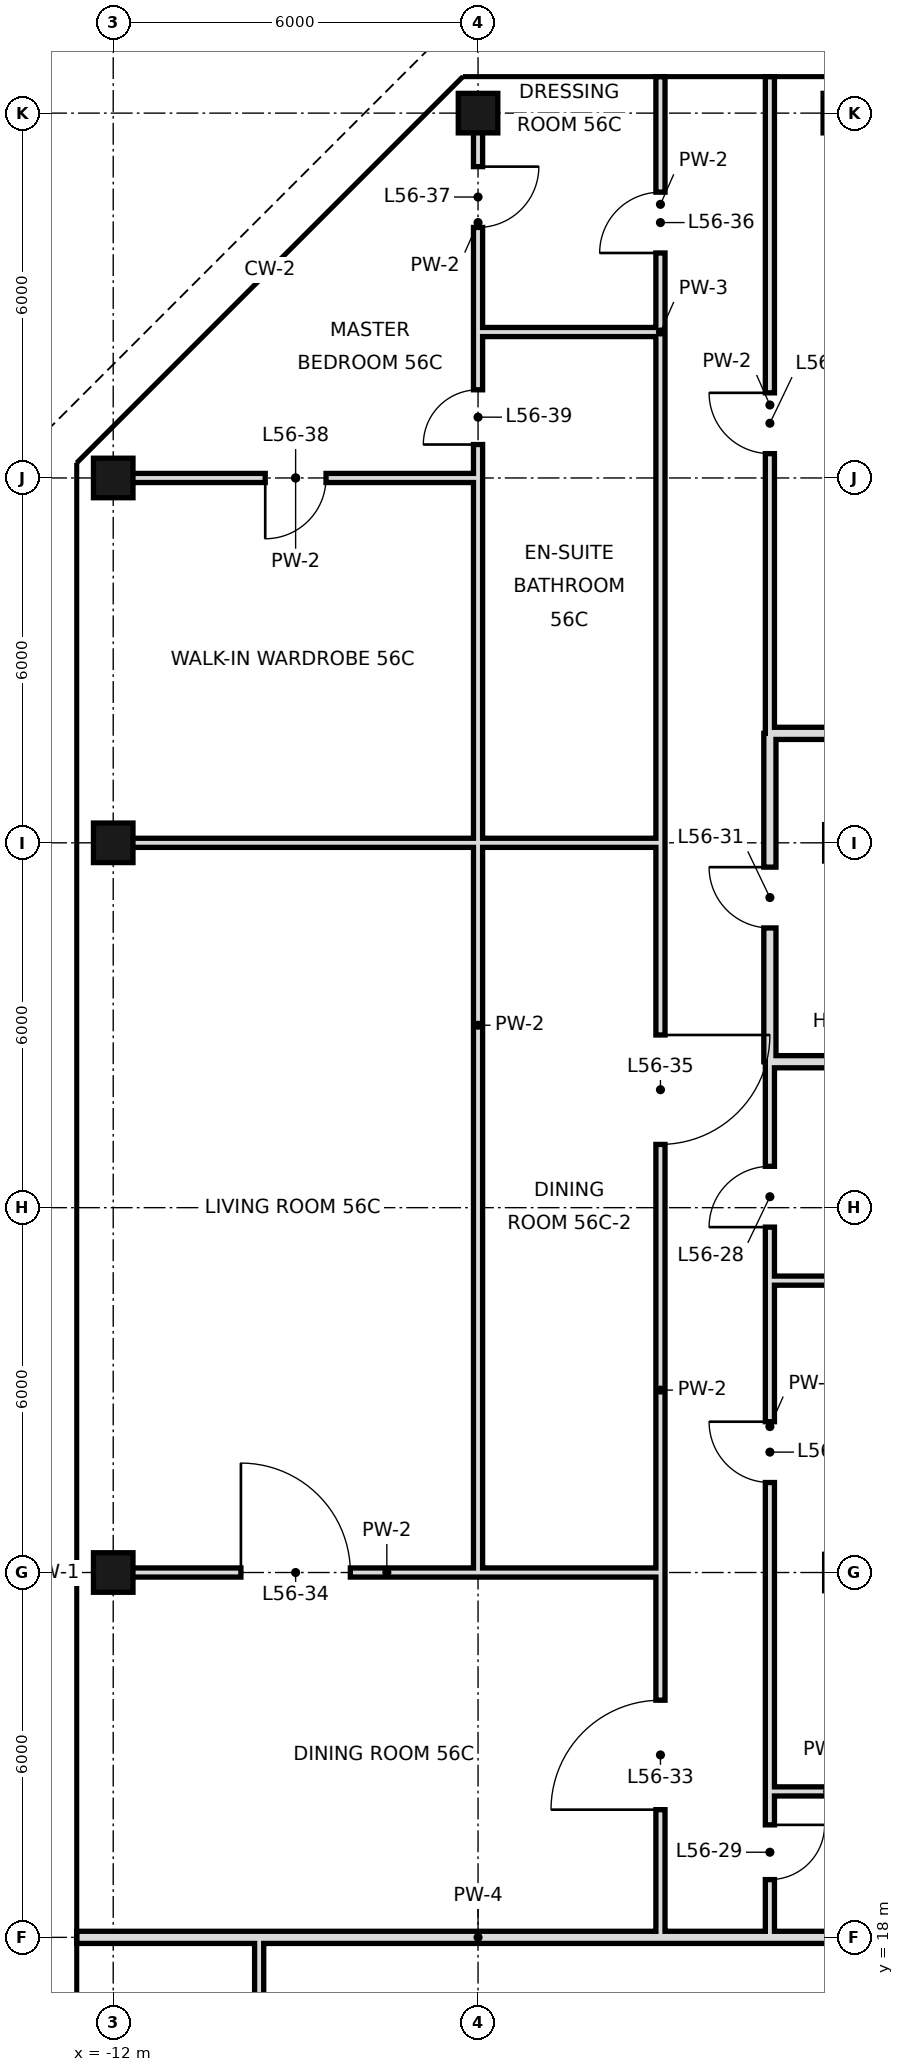
"""IFC4 building model, lengths in metres.
Left out: names, types, materials, properties, quantities, classifications, styles, units other than length and angle.
Written with IfcOpenShell. Run it as: python <this file> out.ifc"""

import sys

from ifc_helpers import new_model, si_unit, direction, frame, frame_2d, origin, origin_2d, place, context, subcontext, project, spatial, rectangle, hollow_rectangle, extrude, element, fill, save


model = new_model("IFC4")
c1 = context("Model", 3, precision=1e-05, world=origin(), true_north=direction((0.0, 1.0)))
c2 = subcontext(c1, "Body", "Model", "MODEL_VIEW")
j1 = project(units=[si_unit("LENGTHUNIT", "METRE"), si_unit("PLANEANGLEUNIT", "RADIAN")], contexts=[c1])
p1 = place(None, origin())
s1 = spatial("IfcSite", under=j1, at=p1, CompositionType="ELEMENT")
p2 = place(p1, origin())
s2 = spatial("IfcBuilding", under=s1, at=p2, CompositionType="ELEMENT")
p3 = place(p2, frame((0.0, 0.0, 239.6)))
s3 = spatial("IfcBuildingStorey", under=s2, at=p3, CompositionType="ELEMENT", Elevation=239.6)
for number, where, z_axis, x_axis in (
    (1, (-12.0, 24.0, 0.0), (0.0, 0.0, 1.0), (1.0, 0.0, 0.0)),
    (2, (-12.0, 36.0, 0.0), (0.0, 0.0, 1.0), (1.0, 0.0, 0.0)),
    (3, (-12.0, 42.0, 0.0), (0.0, 0.0, 1.0), (1.0, 0.0, 0.0)),
    (4, (-6.0, 48.0, 0.0), (0.0, 0.0, 1.0), (1.0, 0.0, 0.0)),
    (5, (0.0, 48.0, 0.0), (0.0, 0.0, 1.0), (1.0, 0.0, 0.0)),
):
    element("IfcColumn", number, at=place(p3, frame(where, z_axis=z_axis, x_axis=x_axis)), inside=s3, PredefinedType="COLUMN", context=c2, shape_type="SweptSolid", body=[
        extrude(hollow_rectangle(XDim=0.65, YDim=0.65, WallThickness=0.032, at=origin_2d()), origin(), (0.0, 0.0, 1.0), 3.6),
    ])
p4 = place(p3, frame((-1.2, 32.4, 0.0), z_axis=(0.0, 0.0, 1.0), x_axis=(0.0, 1.0, 0.0)))
e6 = element("IfcWall", 6, at=p4, inside=s3, PredefinedType="SOLIDWALL", context=c2, shape_type="SweptSolid", body=[
    extrude(rectangle(XDim=5.4, YDim=0.2, at=frame_2d((2.7, 0.0))), origin(), (0.0, 0.0, 1.0), 2.72),
])
p5 = place(p4, frame((2.2, 0.0, 0.0)))
e7 = element("IfcOpeningElement", 7, at=p5, cuts=e6, PredefinedType="OPENING", context=c2, shape_type="SweptSolid", body=[
    extrude(rectangle(XDim=1.0, YDim=2.4, at=frame_2d((0.5, 1.2))), frame((0.0, 0.11, 0.0), z_axis=(0.0, -1.0, 0.0), x_axis=(1.0, 0.0, 0.0)), (0.0, 0.0, 1.0), 0.22),
])
p6 = place(p3, frame((-1.2, 20.4, 0.0), z_axis=(0.0, 0.0, 1.0), x_axis=(0.0, 1.0, 0.0)))
e8 = element("IfcWall", 8, at=p6, inside=s3, PredefinedType="PARTITIONING", context=c2, shape_type="SweptSolid", body=[
    extrude(rectangle(XDim=12.0, YDim=0.15, at=frame_2d((6.0, 0.0))), origin(), (0.0, 0.0, 1.0), 3.42),
])
p7 = place(p6, frame((9.28, 0.0, 0.0)))
e9 = element("IfcOpeningElement", 9, at=p7, cuts=e8, PredefinedType="OPENING", context=c2, shape_type="SweptSolid", body=[
    extrude(rectangle(XDim=1.0, YDim=2.4, at=frame_2d((0.5, 1.2))), frame((0.0, 0.085, 0.0), z_axis=(0.0, -1.0, 0.0), x_axis=(1.0, 0.0, 0.0)), (0.0, 0.0, 1.0), 0.17),
])
p8 = place(p6, frame((5.08, 0.0, 0.0)))
e10 = element("IfcOpeningElement", 10, at=p8, cuts=e8, PredefinedType="OPENING", context=c2, shape_type="SweptSolid", body=[
    extrude(rectangle(XDim=1.0, YDim=2.4, at=frame_2d((0.5, 1.2))), frame((0.0, 0.085, 0.0), z_axis=(0.0, -1.0, 0.0), x_axis=(1.0, 0.0, 0.0)), (0.0, 0.0, 1.0), 0.17),
])
p9 = place(p3, frame((-1.2, 37.8, 0.0), z_axis=(0.0, 0.0, 1.0), x_axis=(0.0, 1.0, 0.0)))
e11 = element("IfcWall", 11, at=p9, inside=s3, PredefinedType="PARTITIONING", context=c2, shape_type="SweptSolid", body=[
    extrude(rectangle(XDim=10.8, YDim=0.15, at=frame_2d((5.4, 0.0))), origin(), (0.0, 0.0, 1.0), 3.42),
])
p10 = place(p9, frame((4.6, 0.0, 0.0)))
e12 = element("IfcOpeningElement", 12, at=p10, cuts=e11, PredefinedType="OPENING", context=c2, shape_type="SweptSolid", body=[
    extrude(rectangle(XDim=1.0, YDim=2.4, at=frame_2d((0.5, 1.2))), frame((0.0, 0.085, 0.0), z_axis=(0.0, -1.0, 0.0), x_axis=(1.0, 0.0, 0.0)), (0.0, 0.0, 1.0), 0.17),
])
p11 = place(p3, frame((-1.2, 18.0, 0.0), z_axis=(0.0, 0.0, 1.0), x_axis=(0.0, 1.0, 0.0)))
e13 = element("IfcWall", 13, at=p11, inside=s3, PredefinedType="PARTITIONING", context=c2, shape_type="SweptSolid", body=[
    extrude(rectangle(XDim=2.4, YDim=0.15, at=frame_2d((1.2, 0.0))), origin(), (0.0, 0.0, 1.0), 3.42),
])
p12 = place(p11, frame((0.95, 0.0, 0.0)))
e14 = element("IfcOpeningElement", 14, at=p12, cuts=e13, PredefinedType="OPENING", context=c2, shape_type="SweptSolid", body=[
    extrude(rectangle(XDim=0.9, YDim=2.4, at=frame_2d((0.45, 1.2))), frame((0.0, 0.085, 0.0), z_axis=(0.0, -1.0, 0.0), x_axis=(1.0, 0.0, 0.0)), (0.0, 0.0, 1.0), 0.17),
])
p13 = place(p3, frame((-3.0, 18.0, 0.0), z_axis=(0.0, 0.0, 1.0), x_axis=(0.0, 1.0, 0.0)))
e15 = element("IfcWall", 15, at=p13, inside=s3, PredefinedType="PARTITIONING", context=c2, shape_type="SweptSolid", body=[
    extrude(rectangle(XDim=18.0, YDim=0.15, at=frame_2d((9.0, 0.0))), origin(), (0.0, 0.0, 1.0), 3.42),
])
p14 = place(p13, frame((2.1, 0.0, 0.0)))
e16 = element("IfcOpeningElement", 16, at=p14, cuts=e15, PredefinedType="OPENING", context=c2, shape_type="SweptSolid", body=[
    extrude(rectangle(XDim=1.8, YDim=2.4, at=frame_2d((0.9, 1.2))), frame((0.0, 0.085, 0.0), z_axis=(0.0, -1.0, 0.0), x_axis=(1.0, 0.0, 0.0)), (0.0, 0.0, 1.0), 0.17),
])
p15 = place(p13, frame((13.04, 0.0, 0.0)))
e17 = element("IfcOpeningElement", 17, at=p15, cuts=e15, PredefinedType="OPENING", context=c2, shape_type="SweptSolid", body=[
    extrude(rectangle(XDim=1.8, YDim=2.4, at=frame_2d((0.9, 1.2))), frame((0.0, 0.085, 0.0), z_axis=(0.0, -1.0, 0.0), x_axis=(1.0, 0.0, 0.0)), (0.0, 0.0, 1.0), 0.17),
])
p16 = place(p3, frame((-3.0, 44.4, 0.0), z_axis=(0.0, 0.0, 1.0), x_axis=(0.0, 1.0, 0.0)))
e18 = element("IfcWall", 18, at=p16, inside=s3, PredefinedType="PARTITIONING", context=c2, shape_type="SweptSolid", body=[
    extrude(rectangle(XDim=4.2, YDim=0.15, at=frame_2d((2.1, 0.0))), origin(), (0.0, 0.0, 1.0), 3.42),
])
p17 = place(p16, frame((1.3, 0.0, 0.0)))
e19 = element("IfcOpeningElement", 19, at=p17, cuts=e18, PredefinedType="OPENING", context=c2, shape_type="SweptSolid", body=[
    extrude(rectangle(XDim=1.0, YDim=2.4, at=frame_2d((0.5, 1.2))), frame((0.0, 0.085, 0.0), z_axis=(0.0, -1.0, 0.0), x_axis=(1.0, 0.0, 0.0)), (0.0, 0.0, 1.0), 0.17),
])
p18 = place(p3, frame((-3.0, 36.0, 0.0), z_axis=(0.0, 0.0, 1.0), x_axis=(0.0, 1.0, 0.0)))
e20 = element("IfcWall", 20, at=p18, inside=s3, PredefinedType="PARTITIONING", context=c2, shape_type="SweptSolid", body=[
    extrude(rectangle(XDim=8.4, YDim=0.15, at=frame_2d((4.2, 0.0))), origin(), (0.0, 0.0, 1.0), 3.42),
])
p19 = place(p3, frame((-6.0, 24.0, 0.0), z_axis=(0.0, 0.0, 1.0), x_axis=(0.0, 1.0, 0.0)))
e21 = element("IfcWall", 21, at=p19, inside=s3, PredefinedType="PARTITIONING", context=c2, shape_type="SweptSolid", body=[
    extrude(rectangle(XDim=12.0, YDim=0.15, at=frame_2d((6.0, 0.0))), origin(), (0.0, 0.0, 1.0), 3.42),
])
p20 = place(p3, frame((-6.0, 44.4, 0.0), z_axis=(0.0, 0.0, 1.0), x_axis=(0.0, 1.0, 0.0)))
e22 = element("IfcWall", 22, at=p20, inside=s3, PredefinedType="PARTITIONING", context=c2, shape_type="SweptSolid", body=[
    extrude(rectangle(XDim=3.6, YDim=0.15, at=frame_2d((1.8, 0.0))), origin(), (0.0, 0.0, 1.0), 3.42),
])
p21 = place(p20, frame((1.72, 0.0, 0.0)))
e23 = element("IfcOpeningElement", 23, at=p21, cuts=e22, PredefinedType="OPENING", context=c2, shape_type="SweptSolid", body=[
    extrude(rectangle(XDim=1.0, YDim=2.4, at=frame_2d((0.5, 1.2))), frame((0.0, 0.085, 0.0), z_axis=(0.0, -1.0, 0.0), x_axis=(1.0, 0.0, 0.0)), (0.0, 0.0, 1.0), 0.17),
])
p22 = place(p3, frame((-6.0, 36.0, 0.0), z_axis=(0.0, 0.0, 1.0), x_axis=(0.0, 1.0, 0.0)))
e24 = element("IfcWall", 24, at=p22, inside=s3, PredefinedType="PARTITIONING", context=c2, shape_type="SweptSolid", body=[
    extrude(rectangle(XDim=8.4, YDim=0.15, at=frame_2d((4.2, 0.0))), origin(), (0.0, 0.0, 1.0), 3.42),
])
p23 = place(p22, frame((6.55, 0.0, 0.0)))
e25 = element("IfcOpeningElement", 25, at=p23, cuts=e24, PredefinedType="OPENING", context=c2, shape_type="SweptSolid", body=[
    extrude(rectangle(XDim=0.9, YDim=2.4, at=frame_2d((0.45, 1.2))), frame((0.0, 0.085, 0.0), z_axis=(0.0, -1.0, 0.0), x_axis=(1.0, 0.0, 0.0)), (0.0, 0.0, 1.0), 0.17),
])
p24 = place(p3, frame((-9.6, 10.8, 0.0), z_axis=(0.0, 0.0, 1.0), x_axis=(0.0, 1.0, 0.0)))
e26 = element("IfcWall", 26, at=p24, inside=s3, PredefinedType="PARTITIONING", context=c2, shape_type="SweptSolid", body=[
    extrude(rectangle(XDim=7.2, YDim=0.15, at=frame_2d((3.6, 0.0))), origin(), (0.0, 0.0, 1.0), 3.42),
])
p25 = place(p3, frame((-12.6, 18.0, 0.0), z_axis=(0.0, 0.0, 1.0), x_axis=(1.0, 0.0, 0.0)))
e27 = element("IfcWall", 27, at=p25, inside=s3, PredefinedType="SOLIDWALL", context=c2, shape_type="SweptSolid", body=[
    extrude(rectangle(XDim=13.2, YDim=0.2, at=frame_2d((6.6, 0.0))), origin(), (0.0, 0.0, 1.0), 2.72),
])
p26 = place(p3, frame((-1.2, 20.4, 0.0), z_axis=(0.0, 0.0, 1.0), x_axis=(1.0, 0.0, 0.0)))
e28 = element("IfcWall", 28, at=p26, inside=s3, PredefinedType="PARTITIONING", context=c2, shape_type="SweptSolid", body=[
    extrude(rectangle(XDim=4.3, YDim=0.15, at=frame_2d((2.15, 0.0))), origin(), (0.0, 0.0, 1.0), 3.42),
])
p27 = place(p3, frame((-12.0, 24.0, 0.0), z_axis=(0.0, 0.0, 1.0), x_axis=(1.0, 0.0, 0.0)))
e29 = element("IfcWall", 29, at=p27, inside=s3, PredefinedType="PARTITIONING", context=c2, shape_type="SweptSolid", body=[
    extrude(rectangle(XDim=9.0, YDim=0.15, at=frame_2d((4.5, 0.0))), origin(), (0.0, 0.0, 1.0), 2.72),
])
p28 = place(p27, frame((2.1, 0.0, 0.0)))
e30 = element("IfcOpeningElement", 30, at=p28, cuts=e29, PredefinedType="OPENING", context=c2, shape_type="SweptSolid", body=[
    extrude(rectangle(XDim=1.8, YDim=2.4, at=frame_2d((0.9, 1.2))), frame((0.0, 0.085, 0.0), z_axis=(0.0, -1.0, 0.0), x_axis=(1.0, 0.0, 0.0)), (0.0, 0.0, 1.0), 0.17),
])
p29 = place(p3, frame((-1.2, 28.8, 0.0), z_axis=(0.0, 0.0, 1.0), x_axis=(1.0, 0.0, 0.0)))
e31 = element("IfcWall", 31, at=p29, inside=s3, PredefinedType="PARTITIONING", context=c2, shape_type="SweptSolid", body=[
    extrude(rectangle(XDim=4.3, YDim=0.15, at=frame_2d((2.15, 0.0))), origin(), (0.0, 0.0, 1.0), 3.42),
])
p30 = place(p3, frame((-1.2, 32.4, 0.0), z_axis=(0.0, 0.0, 1.0), x_axis=(1.0, 0.0, 0.0)))
e32 = element("IfcWall", 32, at=p30, inside=s3, PredefinedType="SOLIDWALL", context=c2, shape_type="SweptSolid", body=[
    extrude(rectangle(XDim=4.3, YDim=0.2, at=frame_2d((2.15, 0.0))), origin(), (0.0, 0.0, 1.0), 2.72),
])
p31 = place(p3, frame((-12.0, 36.0, 0.0), z_axis=(0.0, 0.0, 1.0), x_axis=(1.0, 0.0, 0.0)))
e33 = element("IfcWall", 33, at=p31, inside=s3, PredefinedType="PARTITIONING", context=c2, shape_type="SweptSolid", body=[
    extrude(rectangle(XDim=6.0, YDim=0.15, at=frame_2d((3.0, 0.0))), origin(), (0.0, 0.0, 1.0), 2.72),
])
p32 = place(p3, frame((-6.0, 36.0, 0.0), z_axis=(0.0, 0.0, 1.0), x_axis=(1.0, 0.0, 0.0)))
e34 = element("IfcWall", 34, at=p32, inside=s3, PredefinedType="PARTITIONING", context=c2, shape_type="SweptSolid", body=[
    extrude(rectangle(XDim=3.0, YDim=0.15, at=frame_2d((1.5, 0.0))), origin(), (0.0, 0.0, 1.0), 2.72),
])
p33 = place(p3, frame((-1.2, 37.8, 0.0), z_axis=(0.0, 0.0, 1.0), x_axis=(1.0, 0.0, 0.0)))
e35 = element("IfcWall", 35, at=p33, inside=s3, PredefinedType="SOLIDWALL", context=c2, shape_type="SweptSolid", body=[
    extrude(rectangle(XDim=4.3, YDim=0.2, at=frame_2d((2.15, 0.0))), origin(), (0.0, 0.0, 1.0), 2.72),
])
p34 = place(p3, frame((-12.0, 42.0, 0.0), z_axis=(0.0, 0.0, 1.0), x_axis=(1.0, 0.0, 0.0)))
e36 = element("IfcWall", 36, at=p34, inside=s3, PredefinedType="PARTITIONING", context=c2, shape_type="SweptSolid", body=[
    extrude(rectangle(XDim=6.0, YDim=0.15, at=frame_2d((3.0, 0.0))), origin(), (0.0, 0.0, 1.0), 2.72),
])
p35 = place(p34, frame((2.5, 0.0, 0.0)))
e37 = element("IfcOpeningElement", 37, at=p35, cuts=e36, PredefinedType="OPENING", context=c2, shape_type="SweptSolid", body=[
    extrude(rectangle(XDim=1.0, YDim=2.4, at=frame_2d((0.5, 1.2))), frame((0.0, 0.085, 0.0), z_axis=(0.0, -1.0, 0.0), x_axis=(1.0, 0.0, 0.0)), (0.0, 0.0, 1.0), 0.17),
])
p36 = place(p3, frame((-6.0, 44.4, 0.0), z_axis=(0.0, 0.0, 1.0), x_axis=(1.0, 0.0, 0.0)))
e38 = element("IfcWall", 38, at=p36, inside=s3, PredefinedType="PARTITIONING", context=c2, shape_type="SweptSolid", body=[
    extrude(rectangle(XDim=3.0, YDim=0.15, at=frame_2d((1.5, 0.0))), origin(), (0.0, 0.0, 1.0), 3.42),
])
p37 = place(p7, origin())
e39 = element("IfcDoor", 39, at=p37, inside=s3, OperationType="SINGLE_SWING_LEFT", PredefinedType="DOOR", context=c2, shape_type="SweptSolid", body=[
    extrude(rectangle(XDim=1.0, YDim=2.4, at=frame_2d((0.5, 1.2))), frame((0.0, 0.025, 0.0), z_axis=(0.0, -1.0, 0.0), x_axis=(1.0, 0.0, 0.0)), (0.0, 0.0, 1.0), 0.05),
])
fill(e9, e39)
p38 = place(p12, origin())
e40 = element("IfcDoor", 40, at=p38, inside=s3, OperationType="SINGLE_SWING_RIGHT", PredefinedType="DOOR", context=c2, shape_type="SweptSolid", body=[
    extrude(rectangle(XDim=0.9, YDim=2.4, at=frame_2d((0.45, 1.2))), frame((0.0, 0.025, 0.0), z_axis=(0.0, -1.0, 0.0), x_axis=(1.0, 0.0, 0.0)), (0.0, 0.0, 1.0), 0.05),
])
fill(e14, e40)
p39 = place(p8, frame((1.0, 0.0, 0.0), z_axis=(0.0, 0.0, 1.0), x_axis=(-1.0, 0.0, 0.0)))
e41 = element("IfcDoor", 41, at=p39, inside=s3, OperationType="SINGLE_SWING_LEFT", PredefinedType="DOOR", context=c2, shape_type="SweptSolid", body=[
    extrude(rectangle(XDim=1.0, YDim=2.4, at=frame_2d((0.5, 1.2))), frame((0.0, 0.025, 0.0), z_axis=(0.0, -1.0, 0.0), x_axis=(1.0, 0.0, 0.0)), (0.0, 0.0, 1.0), 0.05),
])
fill(e10, e41)
p40 = place(p5, frame((1.0, 0.0, 0.0), z_axis=(0.0, 0.0, 1.0), x_axis=(-1.0, 0.0, 0.0)))
e42 = element("IfcDoor", 42, at=p40, inside=s3, OperationType="SINGLE_SWING_LEFT", PredefinedType="DOOR", context=c2, shape_type="SweptSolid", body=[
    extrude(rectangle(XDim=1.0, YDim=2.4, at=frame_2d((0.5, 1.2))), frame((0.0, 0.025, 0.0), z_axis=(0.0, -1.0, 0.0), x_axis=(1.0, 0.0, 0.0)), (0.0, 0.0, 1.0), 0.05),
])
fill(e7, e42)
p41 = place(p10, frame((1.0, 0.0, 0.0), z_axis=(0.0, 0.0, 1.0), x_axis=(-1.0, 0.0, 0.0)))
e43 = element("IfcDoor", 43, at=p41, inside=s3, OperationType="SINGLE_SWING_LEFT", PredefinedType="DOOR", context=c2, shape_type="SweptSolid", body=[
    extrude(rectangle(XDim=1.0, YDim=2.4, at=frame_2d((0.5, 1.2))), frame((0.0, 0.025, 0.0), z_axis=(0.0, -1.0, 0.0), x_axis=(1.0, 0.0, 0.0)), (0.0, 0.0, 1.0), 0.05),
])
fill(e12, e43)
p42 = place(p14, origin())
e44 = element("IfcDoor", 44, at=p42, inside=s3, OperationType="SINGLE_SWING_LEFT", PredefinedType="DOOR", context=c2, shape_type="SweptSolid", body=[
    extrude(rectangle(XDim=1.8, YDim=2.4, at=frame_2d((0.9, 1.2))), frame((0.0, 0.025, 0.0), z_axis=(0.0, -1.0, 0.0), x_axis=(1.0, 0.0, 0.0)), (0.0, 0.0, 1.0), 0.05),
])
fill(e16, e44)
p43 = place(p28, origin())
e45 = element("IfcDoor", 45, at=p43, inside=s3, OperationType="SINGLE_SWING_LEFT", PredefinedType="DOOR", context=c2, shape_type="SweptSolid", body=[
    extrude(rectangle(XDim=1.8, YDim=2.4, at=frame_2d((0.9, 1.2))), frame((0.0, 0.025, 0.0), z_axis=(0.0, -1.0, 0.0), x_axis=(1.0, 0.0, 0.0)), (0.0, 0.0, 1.0), 0.05),
])
fill(e30, e45)
p44 = place(p15, origin())
e46 = element("IfcDoor", 46, at=p44, inside=s3, OperationType="SINGLE_SWING_RIGHT", PredefinedType="DOOR", context=c2, shape_type="SweptSolid", body=[
    extrude(rectangle(XDim=1.8, YDim=2.4, at=frame_2d((0.9, 1.2))), frame((0.0, 0.025, 0.0), z_axis=(0.0, -1.0, 0.0), x_axis=(1.0, 0.0, 0.0)), (0.0, 0.0, 1.0), 0.05),
])
fill(e17, e46)
p45 = place(p17, origin())
e47 = element("IfcDoor", 47, at=p45, inside=s3, OperationType="SINGLE_SWING_LEFT", PredefinedType="DOOR", context=c2, shape_type="SweptSolid", body=[
    extrude(rectangle(XDim=1.0, YDim=2.4, at=frame_2d((0.5, 1.2))), frame((0.0, 0.025, 0.0), z_axis=(0.0, -1.0, 0.0), x_axis=(1.0, 0.0, 0.0)), (0.0, 0.0, 1.0), 0.05),
])
fill(e19, e47)
p46 = place(p21, origin())
e48 = element("IfcDoor", 48, at=p46, inside=s3, OperationType="SINGLE_SWING_RIGHT", PredefinedType="DOOR", context=c2, shape_type="SweptSolid", body=[
    extrude(rectangle(XDim=1.0, YDim=2.4, at=frame_2d((0.5, 1.2))), frame((0.0, 0.025, 0.0), z_axis=(0.0, -1.0, 0.0), x_axis=(1.0, 0.0, 0.0)), (0.0, 0.0, 1.0), 0.05),
])
fill(e23, e48)
p47 = place(p35, frame((1.0, 0.0, 0.0), z_axis=(0.0, 0.0, 1.0), x_axis=(-1.0, 0.0, 0.0)))
e49 = element("IfcDoor", 49, at=p47, inside=s3, OperationType="SINGLE_SWING_RIGHT", PredefinedType="DOOR", context=c2, shape_type="SweptSolid", body=[
    extrude(rectangle(XDim=1.0, YDim=2.4, at=frame_2d((0.5, 1.2))), frame((0.0, 0.025, 0.0), z_axis=(0.0, -1.0, 0.0), x_axis=(1.0, 0.0, 0.0)), (0.0, 0.0, 1.0), 0.05),
])
fill(e37, e49)
p48 = place(p23, origin())
e50 = element("IfcDoor", 50, at=p48, inside=s3, OperationType="SINGLE_SWING_LEFT", PredefinedType="DOOR", context=c2, shape_type="SweptSolid", body=[
    extrude(rectangle(XDim=0.9, YDim=2.4, at=frame_2d((0.45, 1.2))), frame((0.0, 0.025, 0.0), z_axis=(0.0, -1.0, 0.0), x_axis=(1.0, 0.0, 0.0)), (0.0, 0.0, 1.0), 0.05),
])
fill(e25, e50)
save(model, sys.argv[1])
